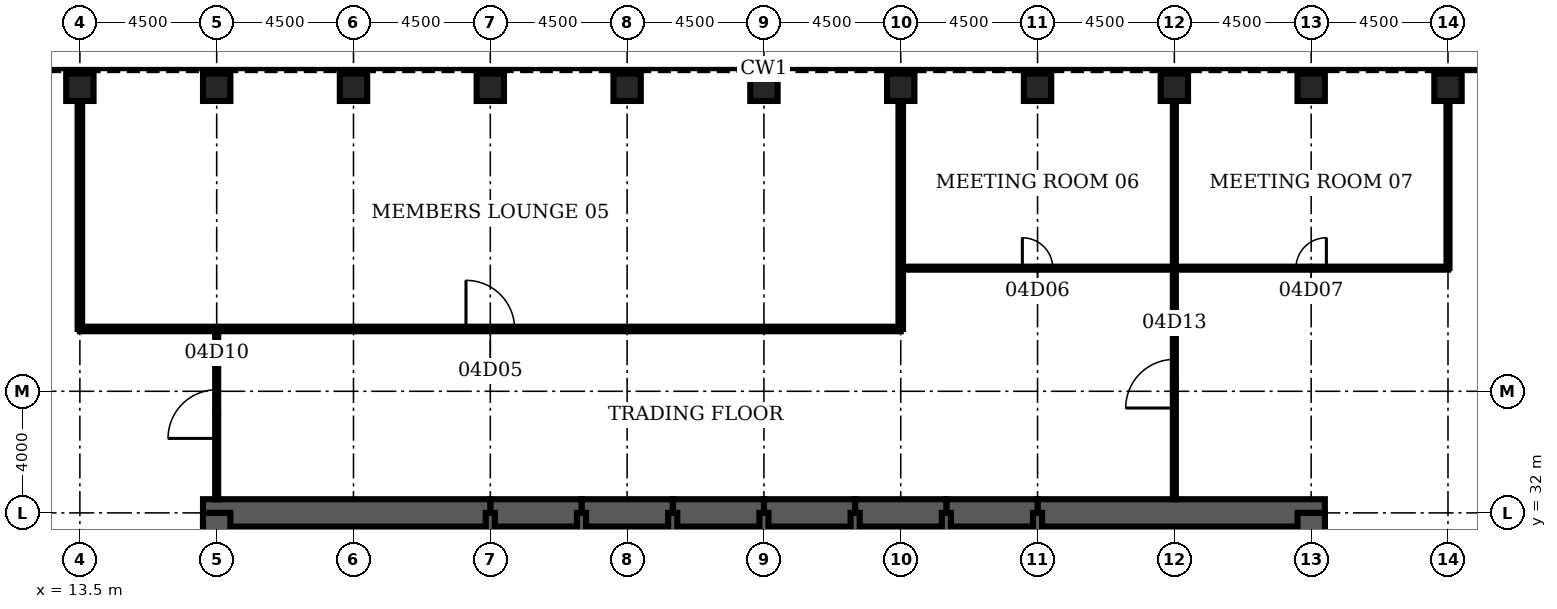
"""IFC4 building model, lengths in metres.
Left out: names, types, materials, properties, quantities, classifications, styles, units other than length and angle.
Written with IfcOpenShell. Run it as: python <this file> out.ifc"""

import sys

from ifc_helpers import new_model, si_unit, direction, frame, frame_2d, origin, origin_2d, place, context, subcontext, project, spatial, rectangle, hollow_rectangle, extrude, element, fill, save


model = new_model("IFC4")
c1 = context("Model", 3, precision=1e-05, world=origin(), true_north=direction((0.0, 1.0)))
c2 = subcontext(c1, "Body", "Model", "MODEL_VIEW")
j1 = project(units=[si_unit("LENGTHUNIT", "METRE"), si_unit("PLANEANGLEUNIT", "RADIAN")], contexts=[c1])
p1 = place(None, origin())
s1 = spatial("IfcSite", under=j1, at=p1, CompositionType="ELEMENT")
p2 = place(p1, origin())
s2 = spatial("IfcBuilding", under=s1, at=p2, CompositionType="ELEMENT")
p3 = place(p2, frame((0.0, 0.0, 23.0)))
s3 = spatial("IfcBuildingStorey", under=s2, at=p3, CompositionType="ELEMENT", Elevation=23.0)
for number, where, z_axis, x_axis in (
    (1, (58.5, 46.0, 0.0), (0.0, 0.0, 1.0), (0.0, 1.0, 0.0)),
    (2, (54.0, 46.0, 0.0), (0.0, 0.0, 1.0), (0.0, 1.0, 0.0)),
    (3, (49.5, 46.0, 0.0), (0.0, 0.0, 1.0), (0.0, 1.0, 0.0)),
    (4, (45.0, 46.0, 0.0), (0.0, 0.0, 1.0), (0.0, 1.0, 0.0)),
    (5, (40.5, 46.0, 0.0), (0.0, 0.0, 1.0), (0.0, 1.0, 0.0)),
    (6, (36.0, 46.0, 0.0), (0.0, 0.0, 1.0), (0.0, 1.0, 0.0)),
    (7, (31.5, 46.0, 0.0), (0.0, 0.0, 1.0), (0.0, 1.0, 0.0)),
    (8, (27.0, 46.0, 0.0), (0.0, 0.0, 1.0), (0.0, 1.0, 0.0)),
    (9, (22.5, 46.0, 0.0), (0.0, 0.0, 1.0), (0.0, 1.0, 0.0)),
    (10, (18.0, 46.0, 0.0), (0.0, 0.0, 1.0), (0.0, 1.0, 0.0)),
    (11, (13.5, 46.0, 0.0), (0.0, 0.0, 1.0), (0.0, 1.0, 0.0)),
):
    element("IfcColumn", number, at=place(p3, frame(where, z_axis=z_axis, x_axis=x_axis)), inside=s3, PredefinedType="COLUMN", context=c2, shape_type="SweptSolid", body=[
        extrude(hollow_rectangle(XDim=0.9, YDim=0.9, WallThickness=0.12, at=origin_2d()), origin(), (0.0, 0.0, 1.0), 4.5),
    ])
p4 = place(p3, frame((54.45, 32.0, 0.0), z_axis=(0.0, 0.0, 1.0), x_axis=(-1.0, 0.0, 0.0)))
e12 = element("IfcWall", 12, at=p4, inside=s3, PredefinedType="SHEAR", context=c2, shape_type="SweptSolid", body=[
    extrude(rectangle(XDim=9.45, YDim=0.9, at=frame_2d((4.725, 0.0))), origin(), (0.0, 0.0, 1.0), 4.5),
])
for number, where, z_axis, x_axis in (
    (13, (45.0, 32.0, 0.0), (0.0, 0.0, 1.0), (-1.0, 0.0, 0.0)),
    (14, (42.0, 32.0, 0.0), (0.0, 0.0, 1.0), (-1.0, 0.0, 0.0)),
    (15, (39.0, 32.0, 0.0), (0.0, 0.0, 1.0), (-1.0, 0.0, 0.0)),
    (16, (36.0, 32.0, 0.0), (0.0, 0.0, 1.0), (-1.0, 0.0, 0.0)),
    (17, (33.0, 32.0, 0.0), (0.0, 0.0, 1.0), (-1.0, 0.0, 0.0)),
    (18, (30.0, 32.0, 0.0), (0.0, 0.0, 1.0), (-1.0, 0.0, 0.0)),
):
    element("IfcWall", number, at=place(p3, frame(where, z_axis=z_axis, x_axis=x_axis)), inside=s3, PredefinedType="SHEAR", context=c2, shape_type="SweptSolid", body=[
        extrude(rectangle(XDim=3.0, YDim=0.9, at=frame_2d((1.5, 0.0))), origin(), (0.0, 0.0, 1.0), 4.5),
    ])
p5 = place(p3, frame((27.0, 32.0, 0.0), z_axis=(0.0, 0.0, 1.0), x_axis=(-1.0, 0.0, 0.0)))
e19 = element("IfcWall", 19, at=p5, inside=s3, PredefinedType="SHEAR", context=c2, shape_type="SweptSolid", body=[
    extrude(rectangle(XDim=9.45, YDim=0.9, at=frame_2d((4.725, 0.0))), origin(), (0.0, 0.0, 1.0), 4.5),
])
for number, where, z_axis, x_axis in (
    (20, (18.0, 32.0, 0.0), (0.0, 0.0, 1.0), (0.0, -1.0, 0.0)),
    (21, (54.0, 28.8, 0.0), (0.0, 0.0, 1.0), (0.0, 1.0, 0.0)),
):
    element("IfcWall", number, at=place(p3, frame(where, z_axis=z_axis, x_axis=x_axis)), inside=s3, PredefinedType="SHEAR", context=c2, shape_type="SweptSolid", body=[
        extrude(rectangle(XDim=3.2, YDim=0.9, at=frame_2d((1.6, 0.0))), origin(), (0.0, 0.0, 1.0), 4.5),
    ])
for number, where, z_axis, x_axis in (
    (22, (27.0, 28.8, 0.0), (0.0, 0.0, 1.0), (0.0, 1.0, 0.0)),
    (23, (30.0, 28.8, 0.0), (0.0, 0.0, 1.0), (0.0, 1.0, 0.0)),
    (24, (33.0, 28.8, 0.0), (0.0, 0.0, 1.0), (0.0, 1.0, 0.0)),
    (25, (36.0, 28.8, 0.0), (0.0, 0.0, 1.0), (0.0, 1.0, 0.0)),
    (26, (39.0, 28.8, 0.0), (0.0, 0.0, 1.0), (0.0, 1.0, 0.0)),
    (27, (42.0, 28.8, 0.0), (0.0, 0.0, 1.0), (0.0, 1.0, 0.0)),
    (28, (45.0, 28.8, 0.0), (0.0, 0.0, 1.0), (0.0, 1.0, 0.0)),
):
    element("IfcWall", number, at=place(p3, frame(where, z_axis=z_axis, x_axis=x_axis)), inside=s3, PredefinedType="SOLIDWALL", context=c2, shape_type="SweptSolid", body=[
        extrude(rectangle(XDim=3.2, YDim=0.3, at=frame_2d((1.6, 0.0))), origin(), (0.0, 0.0, 1.0), 4.5),
    ])
p6 = place(p3, frame((13.5, 38.05, 0.0), z_axis=(0.0, 0.0, 1.0), x_axis=(1.0, 0.0, 0.0)))
e29 = element("IfcWall", 29, at=p6, inside=s3, PredefinedType="PARTITIONING", context=c2, shape_type="SweptSolid", body=[
    extrude(rectangle(XDim=27.0, YDim=0.15, at=frame_2d((13.5, 0.0))), origin(), (0.0, 0.0, 1.0), 3.0),
])
p7 = place(p6, frame((12.7, 0.0, 0.0)))
e30 = element("IfcOpeningElement", 30, at=p7, cuts=e29, PredefinedType="OPENING", context=c2, shape_type="SweptSolid", body=[
    extrude(rectangle(XDim=1.6, YDim=2.1, at=frame_2d((0.8, 1.05))), frame((0.0, 0.085, 0.0), z_axis=(0.0, -1.0, 0.0), x_axis=(1.0, 0.0, 0.0)), (0.0, 0.0, 1.0), 0.17),
])
p8 = place(p3, frame((40.5, 40.05, 0.0), z_axis=(0.0, 0.0, 1.0), x_axis=(1.0, 0.0, 0.0)))
e31 = element("IfcWall", 31, at=p8, inside=s3, PredefinedType="PARTITIONING", context=c2, shape_type="SweptSolid", body=[
    extrude(rectangle(XDim=18.0, YDim=0.1, at=frame_2d((9.0, 0.0))), origin(), (0.0, 0.0, 1.0), 3.0),
])
p9 = place(p8, frame((4.0, 0.0, 0.0)))
e32 = element("IfcOpeningElement", 32, at=p9, cuts=e31, PredefinedType="OPENING", context=c2, shape_type="SweptSolid", body=[
    extrude(rectangle(XDim=1.0, YDim=2.1, at=frame_2d((0.5, 1.05))), frame((0.0, 0.06, 0.0), z_axis=(0.0, -1.0, 0.0), x_axis=(1.0, 0.0, 0.0)), (0.0, 0.0, 1.0), 0.12),
])
p10 = place(p8, frame((13.0, 0.0, 0.0)))
e33 = element("IfcOpeningElement", 33, at=p10, cuts=e31, PredefinedType="OPENING", context=c2, shape_type="SweptSolid", body=[
    extrude(rectangle(XDim=1.0, YDim=2.1, at=frame_2d((0.5, 1.05))), frame((0.0, 0.06, 0.0), z_axis=(0.0, -1.0, 0.0), x_axis=(1.0, 0.0, 0.0)), (0.0, 0.0, 1.0), 0.12),
])
p11 = place(p3, frame((13.5, 38.05, 0.0), z_axis=(0.0, 0.0, 1.0), x_axis=(0.0, 1.0, 0.0)))
e34 = element("IfcWall", 34, at=p11, inside=s3, PredefinedType="PARTITIONING", context=c2, shape_type="SweptSolid", body=[
    extrude(rectangle(XDim=7.5, YDim=0.15, at=frame_2d((3.75, 0.0))), origin(), (0.0, 0.0, 1.0), 3.0),
])
p12 = place(p3, frame((18.0, 32.45, 0.0), z_axis=(0.0, 0.0, 1.0), x_axis=(0.0, 1.0, 0.0)))
e35 = element("IfcWall", 35, at=p12, inside=s3, PredefinedType="PARTITIONING", context=c2, shape_type="SweptSolid", body=[
    extrude(rectangle(XDim=5.6, YDim=0.1, at=frame_2d((2.8, 0.0))), origin(), (0.0, 0.0, 1.0), 3.0),
])
p13 = place(p12, frame((2.0, 0.0, 0.0)))
e36 = element("IfcOpeningElement", 36, at=p13, cuts=e35, PredefinedType="OPENING", context=c2, shape_type="SweptSolid", body=[
    extrude(rectangle(XDim=1.6, YDim=2.1, at=frame_2d((0.8, 1.05))), frame((0.0, 0.06, 0.0), z_axis=(0.0, -1.0, 0.0), x_axis=(1.0, 0.0, 0.0)), (0.0, 0.0, 1.0), 0.12),
])
p14 = place(p3, frame((40.5, 38.05, 0.0), z_axis=(0.0, 0.0, 1.0), x_axis=(0.0, 1.0, 0.0)))
e37 = element("IfcWall", 37, at=p14, inside=s3, PredefinedType="PARTITIONING", context=c2, shape_type="SweptSolid", body=[
    extrude(rectangle(XDim=7.5, YDim=0.15, at=frame_2d((3.75, 0.0))), origin(), (0.0, 0.0, 1.0), 3.0),
])
p15 = place(p3, frame((49.5, 32.45, 0.0), z_axis=(0.0, 0.0, 1.0), x_axis=(0.0, 1.0, 0.0)))
e38 = element("IfcWall", 38, at=p15, inside=s3, PredefinedType="PARTITIONING", context=c2, shape_type="SweptSolid", body=[
    extrude(rectangle(XDim=13.1, YDim=0.1, at=frame_2d((6.55, 0.0))), origin(), (0.0, 0.0, 1.0), 3.0),
])
p16 = place(p15, frame((3.0, 0.0, 0.0)))
e39 = element("IfcOpeningElement", 39, at=p16, cuts=e38, PredefinedType="OPENING", context=c2, shape_type="SweptSolid", body=[
    extrude(rectangle(XDim=1.6, YDim=2.1, at=frame_2d((0.8, 1.05))), frame((0.0, 0.06, 0.0), z_axis=(0.0, -1.0, 0.0), x_axis=(1.0, 0.0, 0.0)), (0.0, 0.0, 1.0), 0.12),
])
p17 = place(p3, frame((58.5, 40.05, 0.0), z_axis=(0.0, 0.0, 1.0), x_axis=(0.0, 1.0, 0.0)))
e40 = element("IfcWall", 40, at=p17, inside=s3, PredefinedType="PARTITIONING", context=c2, shape_type="SweptSolid", body=[
    extrude(rectangle(XDim=5.5, YDim=0.1, at=frame_2d((2.75, 0.0))), origin(), (0.0, 0.0, 1.0), 3.0),
])
p18 = place(p7, origin())
e41 = element("IfcDoor", 41, at=p18, inside=s3, OperationType="SINGLE_SWING_LEFT", PredefinedType="DOOR", context=c2, shape_type="SweptSolid", body=[
    extrude(rectangle(XDim=1.6, YDim=2.1, at=frame_2d((0.8, 1.05))), frame((0.0, 0.025, 0.0), z_axis=(0.0, -1.0, 0.0), x_axis=(1.0, 0.0, 0.0)), (0.0, 0.0, 1.0), 0.05),
])
fill(e30, e41)
p19 = place(p9, origin())
e42 = element("IfcDoor", 42, at=p19, inside=s3, OperationType="SINGLE_SWING_LEFT", PredefinedType="DOOR", context=c2, shape_type="SweptSolid", body=[
    extrude(rectangle(XDim=1.0, YDim=2.1, at=frame_2d((0.5, 1.05))), frame((0.0, 0.025, 0.0), z_axis=(0.0, -1.0, 0.0), x_axis=(1.0, 0.0, 0.0)), (0.0, 0.0, 1.0), 0.05),
])
fill(e32, e42)
p20 = place(p10, origin())
e43 = element("IfcDoor", 43, at=p20, inside=s3, OperationType="SINGLE_SWING_RIGHT", PredefinedType="DOOR", context=c2, shape_type="SweptSolid", body=[
    extrude(rectangle(XDim=1.0, YDim=2.1, at=frame_2d((0.5, 1.05))), frame((0.0, 0.025, 0.0), z_axis=(0.0, -1.0, 0.0), x_axis=(1.0, 0.0, 0.0)), (0.0, 0.0, 1.0), 0.05),
])
fill(e33, e43)
p21 = place(p13, origin())
e44 = element("IfcDoor", 44, at=p21, inside=s3, OperationType="SINGLE_SWING_LEFT", PredefinedType="DOOR", context=c2, shape_type="SweptSolid", body=[
    extrude(rectangle(XDim=1.6, YDim=2.1, at=frame_2d((0.8, 1.05))), frame((0.0, 0.025, 0.0), z_axis=(0.0, -1.0, 0.0), x_axis=(1.0, 0.0, 0.0)), (0.0, 0.0, 1.0), 0.05),
])
fill(e36, e44)
p22 = place(p16, origin())
e45 = element("IfcDoor", 45, at=p22, inside=s3, OperationType="SINGLE_SWING_LEFT", PredefinedType="DOOR", context=c2, shape_type="SweptSolid", body=[
    extrude(rectangle(XDim=1.6, YDim=2.1, at=frame_2d((0.8, 1.05))), frame((0.0, 0.025, 0.0), z_axis=(0.0, -1.0, 0.0), x_axis=(1.0, 0.0, 0.0)), (0.0, 0.0, 1.0), 0.05),
])
fill(e39, e45)
save(model, sys.argv[1])
